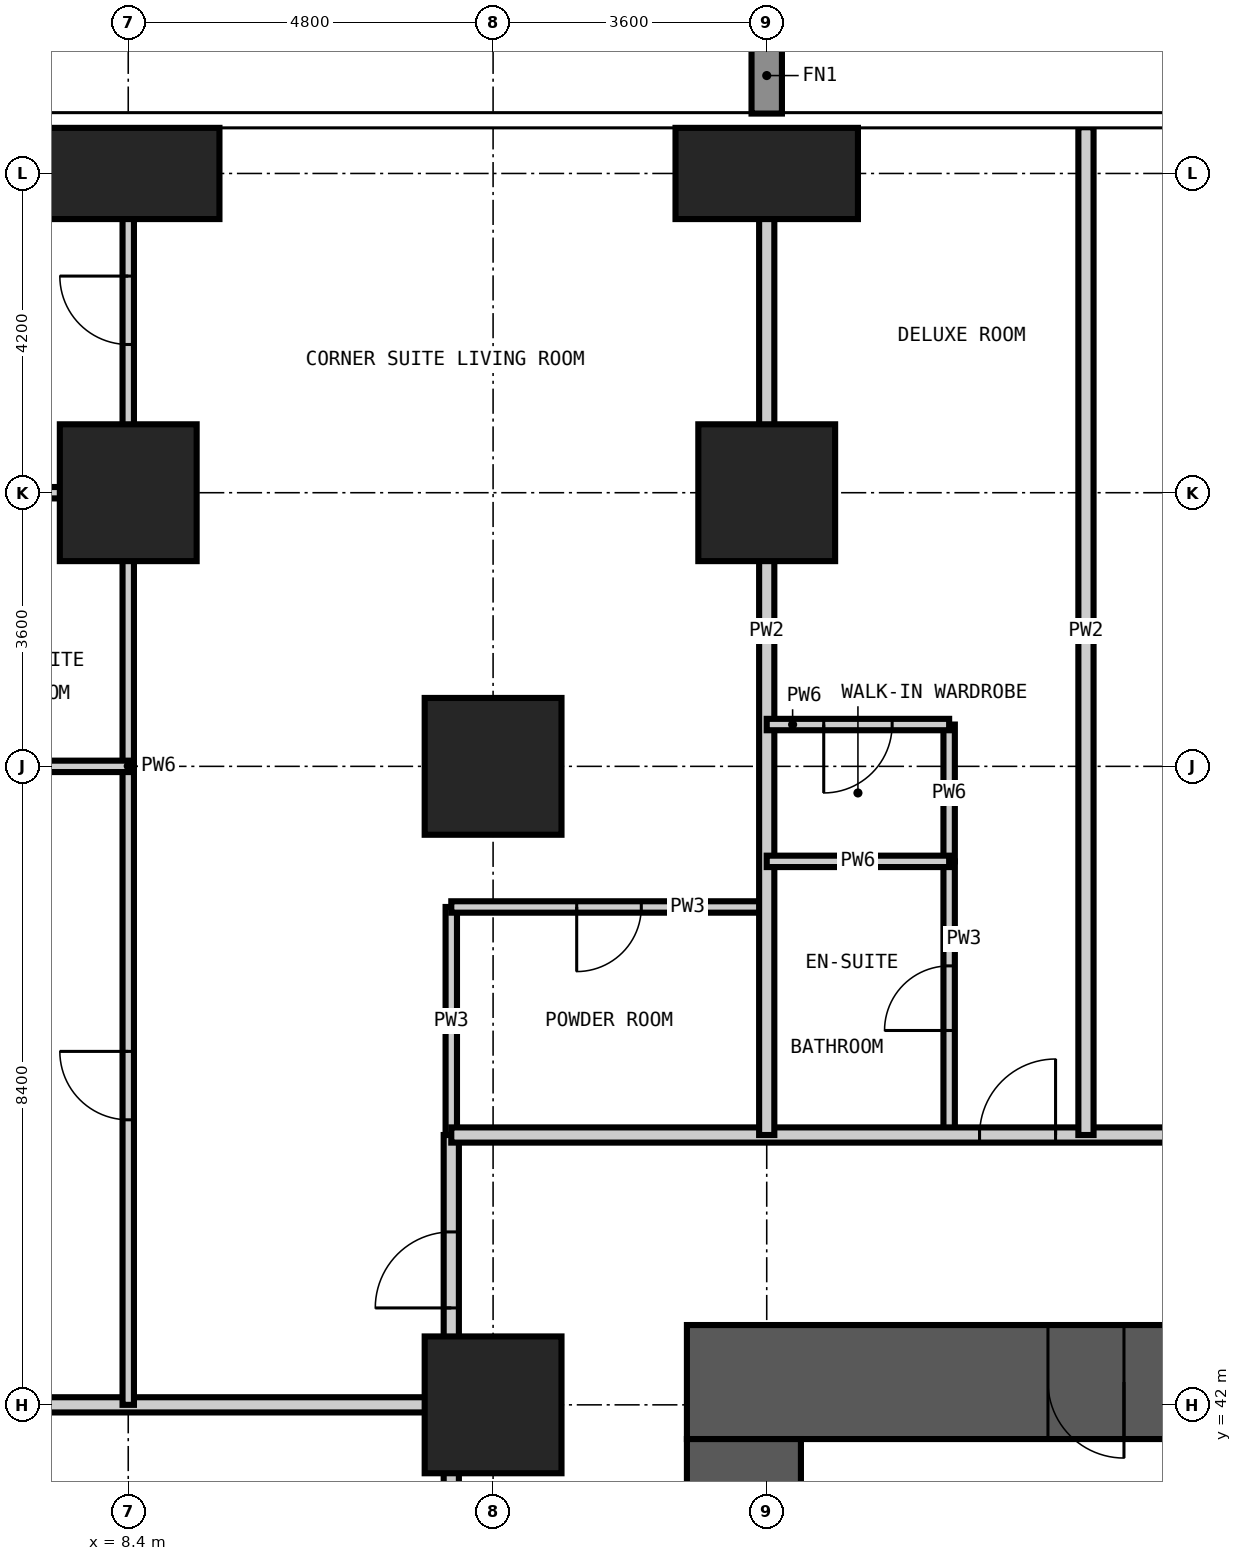
"""IFC4 building model, lengths in metres.
Left out: names, types, materials, properties, quantities, classifications, styles, units other than length and angle.
Written with IfcOpenShell. Run it as: python <this file> out.ifc"""

import sys

from ifc_helpers import new_model, si_unit, direction, frame, frame_2d, origin, origin_2d, place, context, subcontext, project, spatial, rectangle, extrude, element, fill, save


model = new_model("IFC4")
c1 = context("Model", 3, precision=1e-05, world=origin(), true_north=direction((0.0, 1.0)))
c2 = subcontext(c1, "Body", "Model", "MODEL_VIEW")
j1 = project(units=[si_unit("LENGTHUNIT", "METRE"), si_unit("PLANEANGLEUNIT", "RADIAN")], contexts=[c1])
p1 = place(None, origin())
s1 = spatial("IfcSite", under=j1, at=p1, CompositionType="ELEMENT")
p2 = place(p1, origin())
s2 = spatial("IfcBuilding", under=s1, at=p2, CompositionType="ELEMENT")
p3 = place(p2, frame((0.0, 0.0, 70.2)))
s3 = spatial("IfcBuildingStorey", under=s2, at=p3, CompositionType="ELEMENT", Elevation=70.2)
p4 = place(p3, frame((8.4, 54.0, -0.35), z_axis=(0.0, 0.0, 1.0), x_axis=(1.0, 0.0, 0.0)))
e1 = element("IfcColumn", 1, at=p4, inside=s3, PredefinedType="COLUMN", context=c2, shape_type="SweptSolid", body=[
    extrude(rectangle(XDim=1.8, YDim=1.8, at=origin_2d()), origin(), (0.0, 0.0, 1.0), 3.6),
])
p5 = place(p3, frame((8.4, 58.2, -0.35), z_axis=(0.0, 0.0, 1.0), x_axis=(1.0, 0.0, 0.0)))
e2 = element("IfcColumn", 2, at=p5, inside=s3, PredefinedType="COLUMN", context=c2, shape_type="SweptSolid", body=[
    extrude(rectangle(XDim=2.4, YDim=1.2, at=origin_2d()), origin(), (0.0, 0.0, 1.0), 3.6),
])
for number, where, z_axis, x_axis in (
    (3, (13.2, 42.0, -0.35), (0.0, 0.0, 1.0), (1.0, 0.0, 0.0)),
    (4, (13.2, 50.4, -0.35), (0.0, 0.0, 1.0), (1.0, 0.0, 0.0)),
    (5, (16.8, 54.0, -0.35), (0.0, 0.0, 1.0), (1.0, 0.0, 0.0)),
):
    element("IfcColumn", number, at=place(p3, frame(where, z_axis=z_axis, x_axis=x_axis)), inside=s3, PredefinedType="COLUMN", context=c2, shape_type="SweptSolid", body=[
        extrude(rectangle(XDim=1.8, YDim=1.8, at=origin_2d()), origin(), (0.0, 0.0, 1.0), 3.6),
    ])
p6 = place(p3, frame((16.8, 58.2, -0.35), z_axis=(0.0, 0.0, 1.0), x_axis=(1.0, 0.0, 0.0)))
e6 = element("IfcColumn", 6, at=p6, inside=s3, PredefinedType="COLUMN", context=c2, shape_type="SweptSolid", body=[
    extrude(rectangle(XDim=2.4, YDim=1.2, at=origin_2d()), origin(), (0.0, 0.0, 1.0), 3.6),
])
p7 = place(p3, frame((43.05, 42.3, -0.35), z_axis=(0.0, 0.0, 1.0), x_axis=(-1.0, 0.0, 0.0)))
e7 = element("IfcWall", 7, at=p7, inside=s3, PredefinedType="SHEAR", context=c2, shape_type="SweptSolid", body=[
    extrude(rectangle(XDim=27.3, YDim=1.5, at=frame_2d((13.65, 0.0))), origin(), (0.0, 0.0, 1.0), 3.6),
])
p8 = place(p7, frame((21.55, 0.0, 0.35)))
e8 = element("IfcOpeningElement", 8, at=p8, cuts=e7, PredefinedType="OPENING", context=c2, shape_type="SweptSolid", body=[
    extrude(rectangle(XDim=1.0, YDim=2.1, at=frame_2d((0.5, 1.05))), frame((0.0, 0.76, 0.0), z_axis=(0.0, -1.0, 0.0), x_axis=(1.0, 0.0, 0.0)), (0.0, 0.0, 1.0), 1.52),
])
p9 = place(p7, frame((10.95, 0.0, 0.35)))
e9 = element("IfcOpeningElement", 9, at=p9, cuts=e7, PredefinedType="OPENING", context=c2, shape_type="SweptSolid", body=[
    extrude(rectangle(XDim=1.2, YDim=2.2, at=frame_2d((0.6, 1.1))), frame((0.0, 0.76, 0.0), z_axis=(0.0, -1.0, 0.0), x_axis=(1.0, 0.0, 0.0)), (0.0, 0.0, 1.0), 1.52),
])
p10 = place(p3, frame((16.5, 41.55, -0.35), z_axis=(0.0, 0.0, 1.0), x_axis=(0.0, -1.0, 0.0)))
e10 = element("IfcWall", 10, at=p10, inside=s3, PredefinedType="SHEAR", context=c2, shape_type="SweptSolid", body=[
    extrude(rectangle(XDim=24.3, YDim=1.5, at=frame_2d((12.15, 0.0))), origin(), (0.0, 0.0, 1.0), 3.6),
])
p11 = place(p10, frame((11.25, 0.0, 0.35)))
e11 = element("IfcOpeningElement", 11, at=p11, cuts=e10, PredefinedType="OPENING", context=c2, shape_type="SweptSolid", body=[
    extrude(rectangle(XDim=1.8, YDim=2.2, at=frame_2d((0.9, 1.1))), frame((0.0, 0.76, 0.0), z_axis=(0.0, -1.0, 0.0), x_axis=(1.0, 0.0, 0.0)), (0.0, 0.0, 1.0), 1.52),
])
p12 = place(p10, frame((20.05, 0.0, 0.35)))
e12 = element("IfcOpeningElement", 12, at=p12, cuts=e10, PredefinedType="OPENING", context=c2, shape_type="SweptSolid", body=[
    extrude(rectangle(XDim=1.0, YDim=2.1, at=frame_2d((0.5, 1.05))), frame((0.0, 0.76, 0.0), z_axis=(0.0, -1.0, 0.0), x_axis=(1.0, 0.0, 0.0)), (0.0, 0.0, 1.0), 1.52),
])
p13 = place(p10, frame((5.35, 0.0, 0.35)))
e13 = element("IfcOpeningElement", 13, at=p13, cuts=e10, PredefinedType="OPENING", context=c2, shape_type="SweptSolid", body=[
    extrude(rectangle(XDim=1.0, YDim=2.1, at=frame_2d((0.5, 1.05))), frame((0.0, 0.76, 0.0), z_axis=(0.0, -1.0, 0.0), x_axis=(1.0, 0.0, 0.0)), (0.0, 0.0, 1.0), 1.52),
])
p14 = place(p3, frame((12.65, 45.55, 0.0), z_axis=(0.0, 0.0, 1.0), x_axis=(0.0, 1.0, 0.0)))
e14 = element("IfcWall", 14, at=p14, inside=s3, PredefinedType="PARTITIONING", context=c2, shape_type="SweptSolid", body=[
    extrude(rectangle(XDim=3.0, YDim=0.15, at=frame_2d((1.5, 0.0))), origin(), (0.0, 0.0, 1.0), 3.25),
])
p15 = place(p3, frame((19.2, 45.55, 0.0), z_axis=(0.0, 0.0, 1.0), x_axis=(0.0, 1.0, 0.0)))
e15 = element("IfcWall", 15, at=p15, inside=s3, PredefinedType="PARTITIONING", context=c2, shape_type="SweptSolid", body=[
    extrude(rectangle(XDim=3.6, YDim=0.15, at=frame_2d((1.8, 0.0))), origin(), (0.0, 0.0, 1.0), 3.25),
])
p16 = place(p15, frame((1.375, 0.0, 0.0)))
e16 = element("IfcOpeningElement", 16, at=p16, cuts=e15, PredefinedType="OPENING", context=c2, shape_type="SweptSolid", body=[
    extrude(rectangle(XDim=0.85, YDim=2.1, at=frame_2d((0.425, 1.05))), frame((0.0, 0.085, 0.0), z_axis=(0.0, -1.0, 0.0), x_axis=(1.0, 0.0, 0.0)), (0.0, 0.0, 1.0), 0.17),
])
p17 = place(p3, frame((12.65, 48.55, 0.0), z_axis=(0.0, 0.0, 1.0), x_axis=(1.0, 0.0, 0.0)))
e17 = element("IfcWall", 17, at=p17, inside=s3, PredefinedType="PARTITIONING", context=c2, shape_type="SweptSolid", body=[
    extrude(rectangle(XDim=4.15, YDim=0.15, at=frame_2d((2.075, 0.0))), origin(), (0.0, 0.0, 1.0), 3.25),
])
p18 = place(p17, frame((1.65, 0.0, 0.0)))
e18 = element("IfcOpeningElement", 18, at=p18, cuts=e17, PredefinedType="OPENING", context=c2, shape_type="SweptSolid", body=[
    extrude(rectangle(XDim=0.85, YDim=2.1, at=frame_2d((0.425, 1.05))), frame((0.0, 0.085, 0.0), z_axis=(0.0, -1.0, 0.0), x_axis=(1.0, 0.0, 0.0)), (0.0, 0.0, 1.0), 0.17),
])
p19 = place(p3, frame((5.4, 54.0, 0.0), z_axis=(0.0, 0.0, 1.0), x_axis=(1.0, 0.0, 0.0)))
e19 = element("IfcWall", 19, at=p19, inside=s3, PredefinedType="PARTITIONING", context=c2, shape_type="SweptSolid", body=[
    extrude(rectangle(XDim=3.0, YDim=0.15, at=frame_2d((1.5, 0.0))), origin(), (0.0, 0.0, 1.0), 3.25),
])
p20 = place(p3, frame((12.65, 12.65, 0.0), z_axis=(0.0, 0.0, 1.0), x_axis=(0.0, 1.0, 0.0)))
e20 = element("IfcWall", 20, at=p20, inside=s3, PredefinedType="PARTITIONING", context=c2, shape_type="SweptSolid", body=[
    extrude(rectangle(XDim=32.9, YDim=0.2, at=frame_2d((16.45, 0.0))), origin(), (0.0, 0.0, 1.0), 3.25),
])
p21 = place(p20, frame((9.05, 0.0, 0.0)))
e21 = element("IfcOpeningElement", 21, at=p21, cuts=e20, PredefinedType="OPENING", context=c2, shape_type="SweptSolid", body=[
    extrude(rectangle(XDim=1.0, YDim=2.2, at=frame_2d((0.5, 1.1))), frame((0.0, 0.11, 0.0), z_axis=(0.0, -1.0, 0.0), x_axis=(1.0, 0.0, 0.0)), (0.0, 0.0, 1.0), 0.22),
])
p22 = place(p20, frame((15.05, 0.0, 0.0)))
e22 = element("IfcOpeningElement", 22, at=p22, cuts=e20, PredefinedType="OPENING", context=c2, shape_type="SweptSolid", body=[
    extrude(rectangle(XDim=1.0, YDim=2.2, at=frame_2d((0.5, 1.1))), frame((0.0, 0.11, 0.0), z_axis=(0.0, -1.0, 0.0), x_axis=(1.0, 0.0, 0.0)), (0.0, 0.0, 1.0), 0.22),
])
p23 = place(p20, frame((25.85, 0.0, 0.0)))
e23 = element("IfcOpeningElement", 23, at=p23, cuts=e20, PredefinedType="OPENING", context=c2, shape_type="SweptSolid", body=[
    extrude(rectangle(XDim=1.0, YDim=2.2, at=frame_2d((0.5, 1.1))), frame((0.0, 0.11, 0.0), z_axis=(0.0, -1.0, 0.0), x_axis=(1.0, 0.0, 0.0)), (0.0, 0.0, 1.0), 0.22),
])
p24 = place(p20, frame((1.575, 0.0, 0.0)))
e24 = element("IfcOpeningElement", 24, at=p24, cuts=e20, PredefinedType="OPENING", context=c2, shape_type="SweptSolid", body=[
    extrude(rectangle(XDim=1.0, YDim=2.2, at=frame_2d((0.5, 1.1))), frame((0.0, 0.11, 0.0), z_axis=(0.0, -1.0, 0.0), x_axis=(1.0, 0.0, 0.0)), (0.0, 0.0, 1.0), 0.22),
])
p25 = place(p20, frame((30.625, 0.0, 0.0)))
e25 = element("IfcOpeningElement", 25, at=p25, cuts=e20, PredefinedType="OPENING", context=c2, shape_type="SweptSolid", body=[
    extrude(rectangle(XDim=1.0, YDim=2.2, at=frame_2d((0.5, 1.1))), frame((0.0, 0.11, 0.0), z_axis=(0.0, -1.0, 0.0), x_axis=(1.0, 0.0, 0.0)), (0.0, 0.0, 1.0), 0.22),
])
p26 = place(p3, frame((12.65, 45.55, 0.0), z_axis=(0.0, 0.0, 1.0), x_axis=(1.0, 0.0, 0.0)))
e26 = element("IfcWall", 26, at=p26, inside=s3, PredefinedType="PARTITIONING", context=c2, shape_type="SweptSolid", body=[
    extrude(rectangle(XDim=32.3, YDim=0.2, at=frame_2d((16.15, 0.0))), origin(), (0.0, 0.0, 1.0), 3.25),
])
p27 = place(p26, frame((6.95, 0.0, 0.0)))
e27 = element("IfcOpeningElement", 27, at=p27, cuts=e26, PredefinedType="OPENING", context=c2, shape_type="SweptSolid", body=[
    extrude(rectangle(XDim=1.0, YDim=2.2, at=frame_2d((0.5, 1.1))), frame((0.0, 0.11, 0.0), z_axis=(0.0, -1.0, 0.0), x_axis=(1.0, 0.0, 0.0)), (0.0, 0.0, 1.0), 0.22),
])
p28 = place(p26, frame((10.85, 0.0, 0.0)))
e28 = element("IfcOpeningElement", 28, at=p28, cuts=e26, PredefinedType="OPENING", context=c2, shape_type="SweptSolid", body=[
    extrude(rectangle(XDim=1.0, YDim=2.2, at=frame_2d((0.5, 1.1))), frame((0.0, 0.11, 0.0), z_axis=(0.0, -1.0, 0.0), x_axis=(1.0, 0.0, 0.0)), (0.0, 0.0, 1.0), 0.22),
])
p29 = place(p26, frame((21.65, 0.0, 0.0)))
e29 = element("IfcOpeningElement", 29, at=p29, cuts=e26, PredefinedType="OPENING", context=c2, shape_type="SweptSolid", body=[
    extrude(rectangle(XDim=1.0, YDim=2.2, at=frame_2d((0.5, 1.1))), frame((0.0, 0.11, 0.0), z_axis=(0.0, -1.0, 0.0), x_axis=(1.0, 0.0, 0.0)), (0.0, 0.0, 1.0), 0.22),
])
p30 = place(p26, frame((25.55, 0.0, 0.0)))
e30 = element("IfcOpeningElement", 30, at=p30, cuts=e26, PredefinedType="OPENING", context=c2, shape_type="SweptSolid", body=[
    extrude(rectangle(XDim=1.0, YDim=2.2, at=frame_2d((0.5, 1.1))), frame((0.0, 0.11, 0.0), z_axis=(0.0, -1.0, 0.0), x_axis=(1.0, 0.0, 0.0)), (0.0, 0.0, 1.0), 0.22),
])
for number, where, z_axis, x_axis in (
    (31, (16.8, 45.55, 0.0), (0.0, 0.0, 1.0), (0.0, 1.0, 0.0)),
    (32, (21.0, 45.55, 0.0), (0.0, 0.0, 1.0), (0.0, 1.0, 0.0)),
):
    element("IfcWall", number, at=place(p3, frame(where, z_axis=z_axis, x_axis=x_axis)), inside=s3, PredefinedType="PARTITIONING", context=c2, shape_type="SweptSolid", body=[
        extrude(rectangle(XDim=13.258, YDim=0.2, at=frame_2d((6.629, 0.0))), origin(), (0.0, 0.0, 1.0), 3.25),
    ])
p31 = place(p3, frame((-0.008, 42.0, 0.0), z_axis=(0.0, 0.0, 1.0), x_axis=(1.0, 0.0, 0.0)))
e33 = element("IfcWall", 33, at=p31, inside=s3, PredefinedType="PARTITIONING", context=c2, shape_type="SweptSolid", body=[
    extrude(rectangle(XDim=12.658, YDim=0.2, at=frame_2d((6.329, 0.0))), origin(), (0.0, 0.0, 1.0), 3.25),
])
p32 = place(p3, frame((8.4, 42.0, 0.0), z_axis=(0.0, 0.0, 1.0), x_axis=(0.0, 1.0, 0.0)))
e34 = element("IfcWall", 34, at=p32, inside=s3, PredefinedType="PARTITIONING", context=c2, shape_type="SweptSolid", body=[
    extrude(rectangle(XDim=16.808, YDim=0.15, at=frame_2d((8.404, 0.0))), origin(), (0.0, 0.0, 1.0), 3.25),
])
p33 = place(p32, frame((13.95, 0.0, 0.0)))
e35 = element("IfcOpeningElement", 35, at=p33, cuts=e34, PredefinedType="OPENING", context=c2, shape_type="SweptSolid", body=[
    extrude(rectangle(XDim=0.9, YDim=2.1, at=frame_2d((0.45, 1.05))), frame((0.0, 0.085, 0.0), z_axis=(0.0, -1.0, 0.0), x_axis=(1.0, 0.0, 0.0)), (0.0, 0.0, 1.0), 0.17),
])
p34 = place(p32, frame((3.75, 0.0, 0.0)))
e36 = element("IfcOpeningElement", 36, at=p34, cuts=e34, PredefinedType="OPENING", context=c2, shape_type="SweptSolid", body=[
    extrude(rectangle(XDim=0.9, YDim=2.1, at=frame_2d((0.45, 1.05))), frame((0.0, 0.085, 0.0), z_axis=(0.0, -1.0, 0.0), x_axis=(1.0, 0.0, 0.0)), (0.0, 0.0, 1.0), 0.17),
])
p35 = place(p3, frame((19.2, 49.15, 0.0), z_axis=(0.0, 0.0, 1.0), x_axis=(0.0, 1.0, 0.0)))
e37 = element("IfcWall", 37, at=p35, inside=s3, PredefinedType="PARTITIONING", context=c2, shape_type="SweptSolid", body=[
    extrude(rectangle(XDim=1.8, YDim=0.15, at=frame_2d((0.9, 0.0))), origin(), (0.0, 0.0, 1.0), 3.25),
])
p36 = place(p3, frame((16.8, 49.15, 0.0), z_axis=(0.0, 0.0, 1.0), x_axis=(1.0, 0.0, 0.0)))
e38 = element("IfcWall", 38, at=p36, inside=s3, PredefinedType="PARTITIONING", context=c2, shape_type="SweptSolid", body=[
    extrude(rectangle(XDim=2.4, YDim=0.15, at=frame_2d((1.2, 0.0))), origin(), (0.0, 0.0, 1.0), 3.25),
])
p37 = place(p3, frame((-0.008, 50.4, 0.0), z_axis=(0.0, 0.0, 1.0), x_axis=(1.0, 0.0, 0.0)))
e39 = element("IfcWall", 39, at=p37, inside=s3, PredefinedType="PARTITIONING", context=c2, shape_type="SweptSolid", body=[
    extrude(rectangle(XDim=8.408, YDim=0.15, at=frame_2d((4.204, 0.0))), origin(), (0.0, 0.0, 1.0), 3.25),
])
p38 = place(p37, frame((2.958, 0.0, 0.0)))
e40 = element("IfcOpeningElement", 40, at=p38, cuts=e39, PredefinedType="OPENING", context=c2, shape_type="SweptSolid", body=[
    extrude(rectangle(XDim=0.9, YDim=2.1, at=frame_2d((0.45, 1.05))), frame((0.0, 0.085, 0.0), z_axis=(0.0, -1.0, 0.0), x_axis=(1.0, 0.0, 0.0)), (0.0, 0.0, 1.0), 0.17),
])
p39 = place(p3, frame((16.8, 50.95, 0.0), z_axis=(0.0, 0.0, 1.0), x_axis=(1.0, 0.0, 0.0)))
e41 = element("IfcWall", 41, at=p39, inside=s3, PredefinedType="PARTITIONING", context=c2, shape_type="SweptSolid", body=[
    extrude(rectangle(XDim=2.4, YDim=0.15, at=frame_2d((1.2, 0.0))), origin(), (0.0, 0.0, 1.0), 3.25),
])
p40 = place(p39, frame((0.75, 0.0, 0.0)))
e42 = element("IfcOpeningElement", 42, at=p40, cuts=e41, PredefinedType="OPENING", context=c2, shape_type="SweptSolid", body=[
    extrude(rectangle(XDim=0.9, YDim=2.1, at=frame_2d((0.45, 1.05))), frame((0.0, 0.085, 0.0), z_axis=(0.0, -1.0, 0.0), x_axis=(1.0, 0.0, 0.0)), (0.0, 0.0, 1.0), 0.17),
])
p41 = place(p27, origin())
e43 = element("IfcDoor", 43, at=p41, inside=s3, OperationType="SINGLE_SWING_RIGHT", PredefinedType="DOOR", context=c2, shape_type="SweptSolid", body=[
    extrude(rectangle(XDim=1.0, YDim=2.2, at=frame_2d((0.5, 1.1))), frame((0.0, 0.025, 0.0), z_axis=(0.0, -1.0, 0.0), x_axis=(1.0, 0.0, 0.0)), (0.0, 0.0, 1.0), 0.05),
])
fill(e27, e43)
p42 = place(p16, origin())
e44 = element("IfcDoor", 44, at=p42, inside=s3, OperationType="SINGLE_SWING_LEFT", PredefinedType="DOOR", context=c2, shape_type="SweptSolid", body=[
    extrude(rectangle(XDim=0.85, YDim=2.1, at=frame_2d((0.425, 1.05))), frame((0.0, 0.025, 0.0), z_axis=(0.0, -1.0, 0.0), x_axis=(1.0, 0.0, 0.0)), (0.0, 0.0, 1.0), 0.05),
])
fill(e16, e44)
p43 = place(p40, frame((0.9, 0.0, 0.0), z_axis=(0.0, 0.0, 1.0), x_axis=(-1.0, 0.0, 0.0)))
e45 = element("IfcDoor", 45, at=p43, inside=s3, OperationType="SINGLE_SWING_RIGHT", PredefinedType="DOOR", context=c2, shape_type="SweptSolid", body=[
    extrude(rectangle(XDim=0.9, YDim=2.1, at=frame_2d((0.45, 1.05))), frame((0.0, 0.025, 0.0), z_axis=(0.0, -1.0, 0.0), x_axis=(1.0, 0.0, 0.0)), (0.0, 0.0, 1.0), 0.05),
])
fill(e42, e45)
p44 = place(p25, origin())
e46 = element("IfcDoor", 46, at=p44, inside=s3, OperationType="SINGLE_SWING_LEFT", PredefinedType="DOOR", context=c2, shape_type="SweptSolid", body=[
    extrude(rectangle(XDim=1.0, YDim=2.2, at=frame_2d((0.5, 1.1))), frame((0.0, 0.025, 0.0), z_axis=(0.0, -1.0, 0.0), x_axis=(1.0, 0.0, 0.0)), (0.0, 0.0, 1.0), 0.05),
])
fill(e25, e46)
p45 = place(p18, frame((0.85, 0.0, 0.0), z_axis=(0.0, 0.0, 1.0), x_axis=(-1.0, 0.0, 0.0)))
e47 = element("IfcDoor", 47, at=p45, inside=s3, OperationType="SINGLE_SWING_RIGHT", PredefinedType="DOOR", context=c2, shape_type="SweptSolid", body=[
    extrude(rectangle(XDim=0.85, YDim=2.1, at=frame_2d((0.425, 1.05))), frame((0.0, 0.025, 0.0), z_axis=(0.0, -1.0, 0.0), x_axis=(1.0, 0.0, 0.0)), (0.0, 0.0, 1.0), 0.05),
])
fill(e18, e47)
p46 = place(p33, origin())
e48 = element("IfcDoor", 48, at=p46, inside=s3, OperationType="SINGLE_SWING_RIGHT", PredefinedType="DOOR", context=c2, shape_type="SweptSolid", body=[
    extrude(rectangle(XDim=0.9, YDim=2.1, at=frame_2d((0.45, 1.05))), frame((0.0, 0.025, 0.0), z_axis=(0.0, -1.0, 0.0), x_axis=(1.0, 0.0, 0.0)), (0.0, 0.0, 1.0), 0.05),
])
fill(e35, e48)
p47 = place(p34, origin())
e49 = element("IfcDoor", 49, at=p47, inside=s3, OperationType="SINGLE_SWING_RIGHT", PredefinedType="DOOR", context=c2, shape_type="SweptSolid", body=[
    extrude(rectangle(XDim=0.9, YDim=2.1, at=frame_2d((0.45, 1.05))), frame((0.0, 0.025, 0.0), z_axis=(0.0, -1.0, 0.0), x_axis=(1.0, 0.0, 0.0)), (0.0, 0.0, 1.0), 0.05),
])
fill(e36, e49)
p48 = place(p8, origin())
e50 = element("IfcDoor", 50, at=p48, inside=s3, OperationType="SINGLE_SWING_LEFT", PredefinedType="DOOR", context=c2, shape_type="SweptSolid", body=[
    extrude(rectangle(XDim=1.0, YDim=2.1, at=frame_2d((0.5, 1.05))), frame((0.0, 0.025, 0.0), z_axis=(0.0, -1.0, 0.0), x_axis=(1.0, 0.0, 0.0)), (0.0, 0.0, 1.0), 0.05),
])
fill(e8, e50)
save(model, sys.argv[1])
